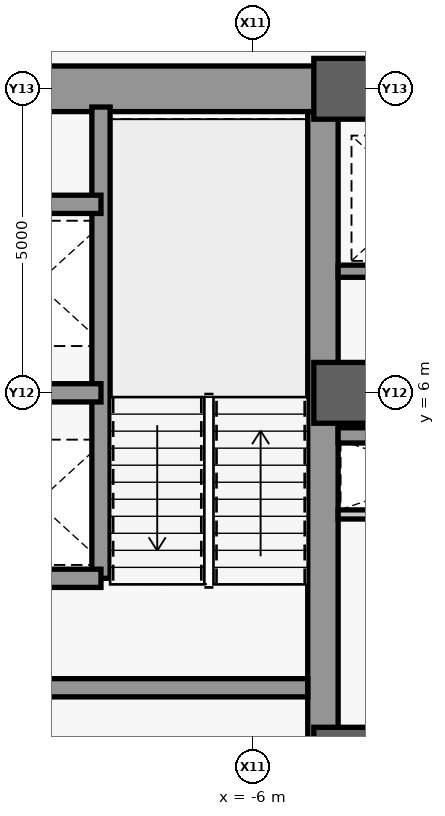
"""IFC4 building model, lengths in metres.
Left out: names, types, materials, properties, quantities, classifications, styles, units other than length and angle.
Written with IfcOpenShell. Run it as: python <this file> out.ifc"""

import sys

from ifc_helpers import new_model, si_unit, direction, frame, frame_2d, origin, origin_2d, place, context, subcontext, project, spatial, rectangle, extrude, source, transform, mapped, element, save


model = new_model("IFC4")
c1 = context("Model", 3, precision=1e-05, world=origin(), true_north=direction((0.0, 1.0)))
c2 = subcontext(c1, "Body", "Model", "MODEL_VIEW")
j1 = project(units=[si_unit("LENGTHUNIT", "METRE"), si_unit("PLANEANGLEUNIT", "RADIAN")], contexts=[c1])
p1 = place(None, origin())
s1 = spatial("IfcSite", under=j1, at=p1, CompositionType="ELEMENT")
p2 = place(p1, origin())
s2 = spatial("IfcBuilding", under=s1, at=p2, CompositionType="ELEMENT")
p3 = place(p2, frame((0.0, 0.0, 140.6)))
s3 = spatial("IfcBuildingStorey", under=s2, at=p3, CompositionType="ELEMENT", Elevation=140.6)
m1 = source(origin(), c2, "Body", "SweptSolid", [
    extrude(rectangle(XDim=21.4, YDim=0.5, at=frame_2d((10.7, 0.0))), origin(), (0.0, 0.0, 1.0), 3.84),
])
p4 = place(p3, frame((-4.85, -10.7, 0.0), z_axis=(0.0, 0.0, 1.0), x_axis=(0.0, 1.0, 0.0)))
e1 = element("IfcWall", 1, at=p4, inside=s3, PredefinedType="SHEAR", context=c2, shape_type="MappedRepresentation", body=[
    mapped(m1, transform((0.0, 0.0, 0.0), scale=1.0)),
])
m2 = source(origin(), c2, "Body", "SweptSolid", [
    extrude(rectangle(XDim=5.85, YDim=0.75, at=frame_2d((2.925, 0.0))), origin(), (0.0, 0.0, 1.0), 3.84),
])
p5 = place(p3, frame((-10.7, 11.0, 0.0), z_axis=(0.0, 0.0, 1.0), x_axis=(1.0, 0.0, 0.0)))
e2 = element("IfcWall", 2, at=p5, inside=s3, PredefinedType="SHEAR", context=c2, shape_type="MappedRepresentation", body=[
    mapped(m2, transform((0.0, 0.0, 0.0), scale=1.0)),
])
m3 = source(origin(), c2, "Body", "SweptSolid", [
    extrude(rectangle(XDim=5.6, YDim=0.3, at=frame_2d((2.8, 0.0))), origin(), (0.0, 0.0, 1.0), 3.84),
])
p6 = place(p3, frame((-10.7, 1.15, 0.0), z_axis=(0.0, 0.0, 1.0), x_axis=(1.0, 0.0, 0.0)))
e3 = element("IfcWall", 3, at=p6, inside=s3, PredefinedType="SHEAR", context=c2, shape_type="MappedRepresentation", body=[
    mapped(m3, transform((0.0, 0.0, 0.0), scale=1.0)),
])
m4 = source(origin(), c2, "Body", "SweptSolid", [
    extrude(rectangle(XDim=9.2, YDim=0.5, at=frame_2d((4.6, 0.0))), origin(), (0.0, 0.0, 1.0), 3.84),
])
p7 = place(p3, frame((-4.6, 11.0, 0.0), z_axis=(0.0, 0.0, 1.0), x_axis=(1.0, 0.0, 0.0)))
e4 = element("IfcWall", 4, at=p7, inside=s3, PredefinedType="SHEAR", context=c2, shape_type="MappedRepresentation", body=[
    mapped(m4, transform((0.0, 0.0, 0.0), scale=1.0)),
])
m5 = source(origin(), c2, "Body", "SweptSolid", [
    extrude(rectangle(XDim=1.8, YDim=2.25, at=frame_2d((0.9, 1.125))), frame((0.0, 0.26, 0.0), z_axis=(0.0, -1.0, 0.0), x_axis=(1.0, 0.0, 0.0)), (0.0, 0.0, 1.0), 0.52),
])
p8 = place(p7, frame((3.7, 0.0, 0.0)))
e5 = element("IfcOpeningElement", 5, at=p8, cuts=e4, PredefinedType="OPENING", context=c2, shape_type="MappedRepresentation", body=[
    mapped(m5, transform((0.0, 0.0, 0.0), scale=1.0)),
])
m6 = source(origin(), c2, "Body", "SweptSolid", [
    extrude(rectangle(XDim=1.0, YDim=1.0, at=origin_2d()), origin(), (0.0, 0.0, 1.0), 4.1),
])
for number, where, z_axis, x_axis in (
    (6, (-4.5, 0.0, 0.0), (0.0, 0.0, 1.0), (1.0, 0.0, 0.0)),
    (7, (-4.5, 6.0, 0.0), (0.0, 0.0, 1.0), (1.0, 0.0, 0.0)),
    (8, (-4.5, 11.0, 0.0), (0.0, 0.0, 1.0), (1.0, 0.0, 0.0)),
):
    element("IfcColumn", number, at=place(p3, frame(where, z_axis=z_axis, x_axis=x_axis)), inside=s3, PredefinedType="COLUMN", context=c2, shape_type="MappedRepresentation", body=[
        mapped(m6, transform((0.0, 0.0, 0.0), scale=1.0)),
    ])
m7 = source(origin(), c2, "Body", "SweptSolid", [
    extrude(rectangle(XDim=7.75, YDim=0.3, at=frame_2d((3.875, 0.0))), origin(), (0.0, 0.0, 1.0), 3.84),
])
p9 = place(p3, frame((-8.5, 2.95, 0.0), z_axis=(0.0, 0.0, 1.0), x_axis=(0.0, 1.0, 0.0)))
e9 = element("IfcWall", 9, at=p9, inside=s3, PredefinedType="SHEAR", context=c2, shape_type="MappedRepresentation", body=[
    mapped(m7, transform((0.0, 0.0, 0.0), scale=1.0)),
])
m8 = source(origin(), c2, "Body", "SweptSolid", [
    extrude(rectangle(XDim=2.2, YDim=0.3, at=frame_2d((1.1, 0.0))), origin(), (0.0, 0.0, 1.0), 3.84),
])
for number, where, z_axis, x_axis in (
    (10, (-10.7, 2.95, 0.0), (0.0, 0.0, 1.0), (1.0, 0.0, 0.0)),
    (11, (-10.7, 6.0, 0.0), (0.0, 0.0, 1.0), (1.0, 0.0, 0.0)),
    (12, (-10.7, 9.1, 0.0), (0.0, 0.0, 1.0), (1.0, 0.0, 0.0)),
):
    element("IfcWall", number, at=place(p3, frame(where, z_axis=z_axis, x_axis=x_axis)), inside=s3, PredefinedType="SHEAR", context=c2, shape_type="MappedRepresentation", body=[
        mapped(m8, transform((0.0, 0.0, 0.0), scale=1.0)),
    ])
m9 = source(origin(), c2, "Body", "SweptSolid", [
    extrude(rectangle(XDim=3.45, YDim=0.15, at=frame_2d((1.725, 0.0))), origin(), (0.0, 0.0, 1.0), 3.84),
])
p10 = place(p3, frame((-4.6, 4.0, 0.0), z_axis=(0.0, 0.0, 1.0), x_axis=(1.0, 0.0, 0.0)))
e13 = element("IfcWall", 13, at=p10, inside=s3, PredefinedType="PARTITIONING", context=c2, shape_type="MappedRepresentation", body=[
    mapped(m9, transform((0.0, 0.0, 0.0), scale=1.0)),
])
m10 = source(origin(), c2, "Body", "SweptSolid", [
    extrude(rectangle(XDim=2.45, YDim=0.2, at=frame_2d((1.225, 0.0))), origin(), (0.0, 0.0, 1.0), 3.84),
])
p11 = place(p3, frame((-4.6, 8.0, 0.0), z_axis=(0.0, 0.0, 1.0), x_axis=(1.0, 0.0, 0.0)))
e14 = element("IfcWall", 14, at=p11, inside=s3, PredefinedType="SHEAR", context=c2, shape_type="MappedRepresentation", body=[
    mapped(m10, transform((0.0, 0.0, 0.0), scale=1.0)),
])
m11 = source(origin(), c2, "Body", "SweptSolid", [
    extrude(rectangle(XDim=9.2, YDim=0.25, at=frame_2d((4.6, 0.0))), origin(), (0.0, 0.0, 1.0), 3.84),
])
p12 = place(p3, frame((-4.6, 5.3, 0.0), z_axis=(0.0, 0.0, 1.0), x_axis=(1.0, 0.0, 0.0)))
e15 = element("IfcWall", 15, at=p12, inside=s3, PredefinedType="SHEAR", context=c2, shape_type="MappedRepresentation", body=[
    mapped(m11, transform((0.0, 0.0, 0.0), scale=1.0)),
])
m12 = source(origin(), c2, "Body", "SweptSolid", [
    extrude(rectangle(XDim=1.05, YDim=2.2, at=frame_2d((0.525, 1.1))), frame((0.0, 0.135, 0.0), z_axis=(0.0, -1.0, 0.0), x_axis=(1.0, 0.0, 0.0)), (0.0, 0.0, 1.0), 0.27),
])
p13 = place(p12, frame((4.075, 0.0, 0.0)))
e16 = element("IfcOpeningElement", 16, at=p13, cuts=e15, PredefinedType="OPENING", context=c2, shape_type="MappedRepresentation", body=[
    mapped(m12, transform((0.0, 0.0, 0.0), scale=1.0)),
])
save(model, sys.argv[1])
